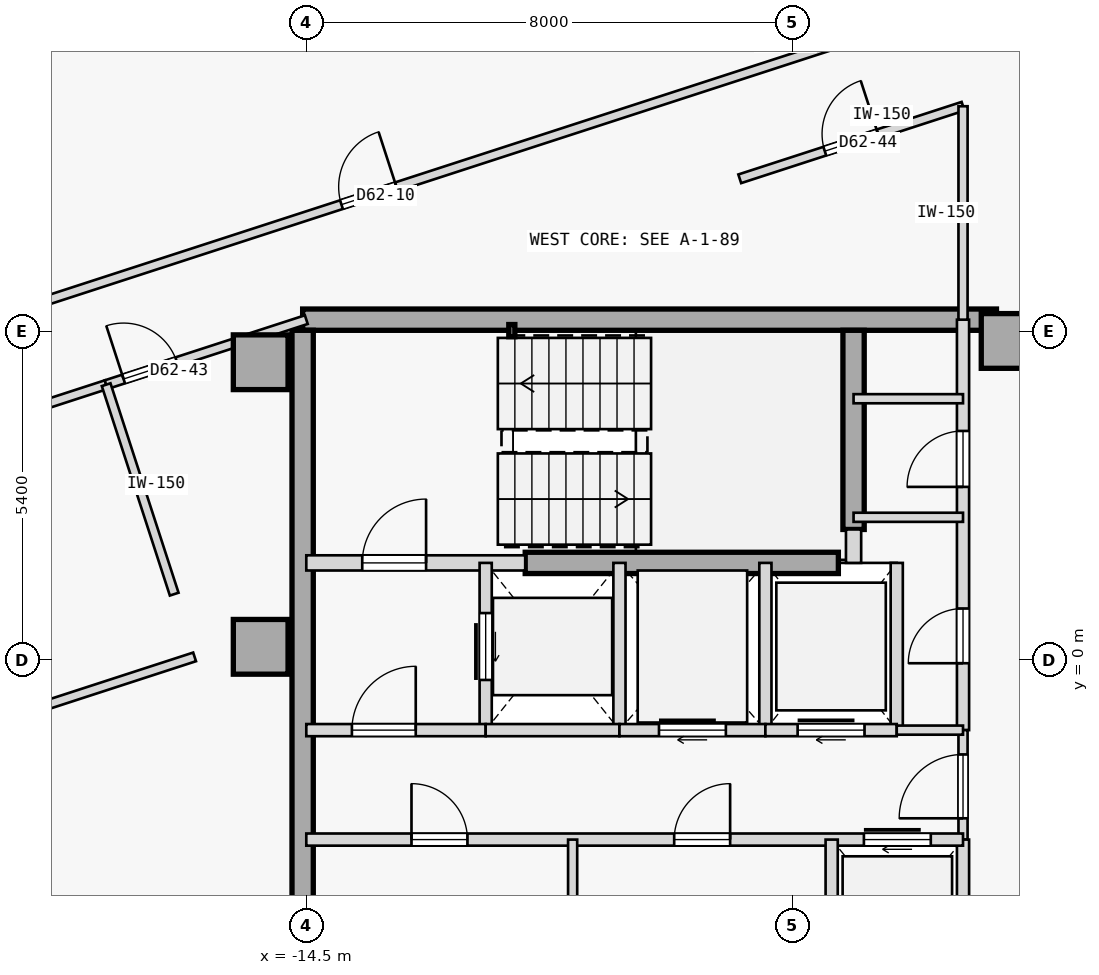
"""IFC4 building model, lengths in metres.
Left out: names, types, materials, properties, quantities, classifications, styles, units other than length and angle.
Written with IfcOpenShell. Run it as: python <this file> out.ifc"""

import sys

from ifc_helpers import new_model, si_unit, direction, frame, frame_2d, origin, origin_2d, place, context, subcontext, project, spatial, rectangle, hollow_rectangle, extrude, element, fill, save


model = new_model("IFC4")
c1 = context("Model", 3, precision=1e-05, world=origin(), true_north=direction((0.0, 1.0)))
c2 = subcontext(c1, "Body", "Model", "MODEL_VIEW")
j1 = project(units=[si_unit("LENGTHUNIT", "METRE"), si_unit("PLANEANGLEUNIT", "RADIAN")], contexts=[c1])
p1 = place(None, origin())
s1 = spatial("IfcSite", under=j1, at=p1, CompositionType="ELEMENT")
p2 = place(p1, origin())
s2 = spatial("IfcBuilding", under=s1, at=p2, CompositionType="ELEMENT")
p3 = place(p2, frame((0.0, 0.0, 234.35)))
s3 = spatial("IfcBuildingStorey", under=s2, at=p3, CompositionType="ELEMENT", Elevation=234.35)
for number, where, z_axis, x_axis in (
    (1, (-15.25, 4.9, 0.0), (0.0, 0.0, 1.0), (1.0, 0.0, 0.0)),
    (2, (-15.25, 0.22, 0.0), (0.0, 0.0, 1.0), (1.0, 0.0, 0.0)),
    (3, (-2.95, 5.25, 0.0), (0.0, 0.0, 1.0), (1.0, 0.0, 0.0)),
):
    element("IfcColumn", number, at=place(p3, frame(where, z_axis=z_axis, x_axis=x_axis)), inside=s3, PredefinedType="COLUMN", context=c2, shape_type="SweptSolid", body=[
        extrude(rectangle(XDim=0.9, YDim=0.9, at=origin_2d()), origin(), (0.0, 0.0, 1.0), 3.35),
    ])
p4 = place(p3, frame((-14.56, 5.6, 0.0), z_axis=(0.0, 0.0, 1.0), x_axis=(1.0, 0.0, 0.0)))
e4 = element("IfcWall", 4, at=p4, inside=s3, PredefinedType="SHEAR", context=c2, shape_type="SweptSolid", body=[
    extrude(rectangle(XDim=11.41, YDim=0.35, at=frame_2d((5.705, 0.0))), origin(), (0.0, 0.0, 1.0), 3.125),
])
p5 = place(p3, frame((-14.56, -5.425, 0.0), z_axis=(0.0, 0.0, 1.0), x_axis=(0.0, 1.0, 0.0)))
e5 = element("IfcWall", 5, at=p5, inside=s3, PredefinedType="SHEAR", context=c2, shape_type="SweptSolid", body=[
    extrude(rectangle(XDim=10.85, YDim=0.35, at=frame_2d((5.425, 0.0))), origin(), (0.0, 0.0, 1.0), 3.125),
])
p6 = place(p3, frame((-5.5, 2.15, 0.0), z_axis=(0.0, 0.0, 1.0), x_axis=(0.0, 1.0, 0.0)))
e6 = element("IfcWall", 6, at=p6, inside=s3, PredefinedType="SHEAR", context=c2, shape_type="SweptSolid", body=[
    extrude(rectangle(XDim=3.275, YDim=0.35, at=frame_2d((1.638, 0.0))), origin(), (0.0, 0.0, 1.0), 3.125),
])
p7 = place(p3, frame((-10.9, 1.6, 0.0), z_axis=(0.0, 0.0, 1.0), x_axis=(1.0, 0.0, 0.0)))
e7 = element("IfcWall", 7, at=p7, inside=s3, PredefinedType="SHEAR", context=c2, shape_type="SweptSolid", body=[
    extrude(rectangle(XDim=5.15, YDim=0.35, at=frame_2d((2.575, 0.0))), origin(), (0.0, 0.0, 1.0), 3.125),
])
p8 = place(p3, frame((-11.12, 5.42, 0.0), z_axis=(0.0, 0.0, 1.0), x_axis=(1.0, 0.0, 0.0)))
e8 = element("IfcColumn", 8, at=p8, inside=s3, PredefinedType="COLUMN", context=c2, shape_type="SweptSolid", body=[
    extrude(hollow_rectangle(XDim=0.1, YDim=0.2, WallThickness=0.008, at=origin_2d()), origin(), (0.0, 0.0, 1.0), 3.35),
])
p9 = place(p3, frame((-14.5, 1.6, 0.0), z_axis=(0.0, 0.0, 1.0), x_axis=(1.0, 0.0, 0.0)))
e9 = element("IfcWall", 9, at=p9, inside=s3, PredefinedType="STANDARD", context=c2, shape_type="SweptSolid", body=[
    extrude(rectangle(XDim=3.6, YDim=0.25, at=frame_2d((1.8, 0.0))), origin(), (0.0, 0.0, 1.0), 3.125),
])
p10 = place(p9, frame((0.92, 0.0, 0.0)))
e10 = element("IfcOpeningElement", 10, at=p10, cuts=e9, PredefinedType="OPENING", context=c2, shape_type="SweptSolid", body=[
    extrude(rectangle(XDim=1.05, YDim=2.15, at=frame_2d((0.525, 1.075))), frame((0.0, 0.135, 0.0), z_axis=(0.0, -1.0, 0.0), x_axis=(1.0, 0.0, 0.0)), (0.0, 0.0, 1.0), 0.27),
])
p11 = place(p3, frame((-5.5, 1.6, 0.0), z_axis=(0.0, 0.0, 1.0), x_axis=(0.0, 1.0, 0.0)))
e11 = element("IfcWall", 11, at=p11, inside=s3, PredefinedType="STANDARD", context=c2, shape_type="SweptSolid", body=[
    extrude(rectangle(XDim=0.55, YDim=0.25, at=frame_2d((0.275, 0.0))), origin(), (0.0, 0.0, 1.0), 3.125),
])
p12 = place(p3, frame((-3.7, -1.15, 0.0), z_axis=(0.0, 0.0, 1.0), x_axis=(0.0, 1.0, 0.0)))
e12 = element("IfcWall", 12, at=p12, inside=s3, PredefinedType="STANDARD", context=c2, shape_type="SweptSolid", body=[
    extrude(rectangle(XDim=6.75, YDim=0.2, at=frame_2d((3.375, 0.0))), origin(), (0.0, 0.0, 1.0), 3.125),
])
p13 = place(p12, frame((1.1, 0.0, 0.0)))
e13 = element("IfcOpeningElement", 13, at=p13, cuts=e12, PredefinedType="OPENING", context=c2, shape_type="SweptSolid", body=[
    extrude(rectangle(XDim=0.9, YDim=2.15, at=frame_2d((0.45, 1.075))), frame((0.0, 0.11, 0.0), z_axis=(0.0, -1.0, 0.0), x_axis=(1.0, 0.0, 0.0)), (0.0, 0.0, 1.0), 0.22),
])
p14 = place(p12, frame((4.0, 0.0, 0.0)))
e14 = element("IfcOpeningElement", 14, at=p14, cuts=e12, PredefinedType="OPENING", context=c2, shape_type="SweptSolid", body=[
    extrude(rectangle(XDim=0.92, YDim=2.15, at=frame_2d((0.46, 1.075))), frame((0.0, 0.11, 0.0), z_axis=(0.0, -1.0, 0.0), x_axis=(1.0, 0.0, 0.0)), (0.0, 0.0, 1.0), 0.22),
])
p15 = place(p3, frame((-3.7, -2.95, 0.0), z_axis=(0.0, 0.0, 1.0), x_axis=(0.0, 1.0, 0.0)))
e15 = element("IfcWall", 15, at=p15, inside=s3, PredefinedType="PARTITIONING", context=c2, shape_type="SweptSolid", body=[
    extrude(rectangle(XDim=1.8, YDim=0.15, at=frame_2d((0.9, 0.0))), origin(), (0.0, 0.0, 1.0), 3.125),
])
p16 = place(p15, frame((0.35, 0.0, 0.0)))
e16 = element("IfcOpeningElement", 16, at=p16, cuts=e15, PredefinedType="OPENING", context=c2, shape_type="SweptSolid", body=[
    extrude(rectangle(XDim=1.05, YDim=2.18, at=frame_2d((0.525, 1.09))), frame((0.0, 0.085, 0.0), z_axis=(0.0, -1.0, 0.0), x_axis=(1.0, 0.0, 0.0)), (0.0, 0.0, 1.0), 0.17),
])
p17 = place(p3, frame((-3.7, -5.6, 0.0), z_axis=(0.0, 0.0, 1.0), x_axis=(0.0, 1.0, 0.0)))
e17 = element("IfcWall", 17, at=p17, inside=s3, PredefinedType="STANDARD", context=c2, shape_type="SweptSolid", body=[
    extrude(rectangle(XDim=2.65, YDim=0.2, at=frame_2d((1.325, 0.0))), origin(), (0.0, 0.0, 1.0), 3.125),
])
p18 = place(p3, frame((-11.55, -1.15, 0.0), z_axis=(0.0, 0.0, 1.0), x_axis=(0.0, 1.0, 0.0)))
e18 = element("IfcWall", 18, at=p18, inside=s3, PredefinedType="STANDARD", context=c2, shape_type="SweptSolid", body=[
    extrude(rectangle(XDim=2.75, YDim=0.2, at=frame_2d((1.375, 0.0))), origin(), (0.0, 0.0, 1.0), 3.125),
])
p19 = place(p18, frame((0.825, 0.0, 0.0)))
e19 = element("IfcOpeningElement", 19, at=p19, cuts=e18, PredefinedType="OPENING", context=c2, shape_type="SweptSolid", body=[
    extrude(rectangle(XDim=1.1, YDim=2.15, at=frame_2d((0.55, 1.075))), frame((0.0, 0.11, 0.0), z_axis=(0.0, -1.0, 0.0), x_axis=(1.0, 0.0, 0.0)), (0.0, 0.0, 1.0), 0.22),
])
p20 = place(p3, frame((-9.35, -1.15, 0.0), z_axis=(0.0, 0.0, 1.0), x_axis=(0.0, 1.0, 0.0)))
e20 = element("IfcWall", 20, at=p20, inside=s3, PredefinedType="STANDARD", context=c2, shape_type="SweptSolid", body=[
    extrude(rectangle(XDim=2.75, YDim=0.2, at=frame_2d((1.375, 0.0))), origin(), (0.0, 0.0, 1.0), 3.125),
])
p21 = place(p3, frame((-14.5, -1.15, 0.0), z_axis=(0.0, 0.0, 1.0), x_axis=(1.0, 0.0, 0.0)))
e21 = element("IfcWall", 21, at=p21, inside=s3, PredefinedType="STANDARD", context=c2, shape_type="SweptSolid", body=[
    extrude(rectangle(XDim=2.95, YDim=0.2, at=frame_2d((1.475, 0.0))), origin(), (0.0, 0.0, 1.0), 3.125),
])
p22 = place(p21, frame((0.75, 0.0, 0.0)))
e22 = element("IfcOpeningElement", 22, at=p22, cuts=e21, PredefinedType="OPENING", context=c2, shape_type="SweptSolid", body=[
    extrude(rectangle(XDim=1.05, YDim=2.18, at=frame_2d((0.525, 1.09))), frame((0.0, 0.11, 0.0), z_axis=(0.0, -1.0, 0.0), x_axis=(1.0, 0.0, 0.0)), (0.0, 0.0, 1.0), 0.22),
])
p23 = place(p3, frame((-11.55, -1.15, 0.0), z_axis=(0.0, 0.0, 1.0), x_axis=(1.0, 0.0, 0.0)))
e23 = element("IfcWall", 23, at=p23, inside=s3, PredefinedType="STANDARD", context=c2, shape_type="SweptSolid", body=[
    extrude(rectangle(XDim=2.2, YDim=0.2, at=frame_2d((1.1, 0.0))), origin(), (0.0, 0.0, 1.0), 3.125),
])
p24 = place(p3, frame((-6.95, -1.15, 0.0), z_axis=(0.0, 0.0, 1.0), x_axis=(0.0, 1.0, 0.0)))
e24 = element("IfcWall", 24, at=p24, inside=s3, PredefinedType="STANDARD", context=c2, shape_type="SweptSolid", body=[
    extrude(rectangle(XDim=2.75, YDim=0.2, at=frame_2d((1.375, 0.0))), origin(), (0.0, 0.0, 1.0), 3.125),
])
p25 = place(p3, frame((-9.35, -1.15, 0.0), z_axis=(0.0, 0.0, 1.0), x_axis=(1.0, 0.0, 0.0)))
e25 = element("IfcWall", 25, at=p25, inside=s3, PredefinedType="STANDARD", context=c2, shape_type="SweptSolid", body=[
    extrude(rectangle(XDim=2.4, YDim=0.2, at=frame_2d((1.2, 0.0))), origin(), (0.0, 0.0, 1.0), 3.125),
])
p26 = place(p25, frame((0.65, 0.0, 0.0)))
e26 = element("IfcOpeningElement", 26, at=p26, cuts=e25, PredefinedType="OPENING", context=c2, shape_type="SweptSolid", body=[
    extrude(rectangle(XDim=1.1, YDim=2.15, at=frame_2d((0.55, 1.075))), frame((0.0, 0.11, 0.0), z_axis=(0.0, -1.0, 0.0), x_axis=(1.0, 0.0, 0.0)), (0.0, 0.0, 1.0), 0.22),
])
p27 = place(p3, frame((-4.79, -1.15, 0.0), z_axis=(0.0, 0.0, 1.0), x_axis=(0.0, 1.0, 0.0)))
e27 = element("IfcWall", 27, at=p27, inside=s3, PredefinedType="STANDARD", context=c2, shape_type="SweptSolid", body=[
    extrude(rectangle(XDim=2.75, YDim=0.2, at=frame_2d((1.375, 0.0))), origin(), (0.0, 0.0, 1.0), 3.125),
])
p28 = place(p3, frame((-6.95, -1.15, 0.0), z_axis=(0.0, 0.0, 1.0), x_axis=(1.0, 0.0, 0.0)))
e28 = element("IfcWall", 28, at=p28, inside=s3, PredefinedType="STANDARD", context=c2, shape_type="SweptSolid", body=[
    extrude(rectangle(XDim=2.16, YDim=0.2, at=frame_2d((1.08, 0.0))), origin(), (0.0, 0.0, 1.0), 3.125),
])
p29 = place(p28, frame((0.53, 0.0, 0.0)))
e29 = element("IfcOpeningElement", 29, at=p29, cuts=e28, PredefinedType="OPENING", context=c2, shape_type="SweptSolid", body=[
    extrude(rectangle(XDim=1.1, YDim=2.15, at=frame_2d((0.55, 1.075))), frame((0.0, 0.11, 0.0), z_axis=(0.0, -1.0, 0.0), x_axis=(1.0, 0.0, 0.0)), (0.0, 0.0, 1.0), 0.22),
])
p30 = place(p3, frame((-4.79, -1.15, 0.0), z_axis=(0.0, 0.0, 1.0), x_axis=(1.0, 0.0, 0.0)))
e30 = element("IfcWall", 30, at=p30, inside=s3, PredefinedType="PARTITIONING", context=c2, shape_type="SweptSolid", body=[
    extrude(rectangle(XDim=1.09, YDim=0.15, at=frame_2d((0.545, 0.0))), origin(), (0.0, 0.0, 1.0), 3.125),
])
p31 = place(p3, frame((-14.5, -2.95, 0.0), z_axis=(0.0, 0.0, 1.0), x_axis=(1.0, 0.0, 0.0)))
e31 = element("IfcWall", 31, at=p31, inside=s3, PredefinedType="STANDARD", context=c2, shape_type="SweptSolid", body=[
    extrude(rectangle(XDim=10.8, YDim=0.2, at=frame_2d((5.4, 0.0))), origin(), (0.0, 0.0, 1.0), 3.125),
])
p32 = place(p31, frame((9.17, 0.0, 0.0)))
e32 = element("IfcOpeningElement", 32, at=p32, cuts=e31, PredefinedType="OPENING", context=c2, shape_type="SweptSolid", body=[
    extrude(rectangle(XDim=1.1, YDim=2.15, at=frame_2d((0.55, 1.075))), frame((0.0, 0.11, 0.0), z_axis=(0.0, -1.0, 0.0), x_axis=(1.0, 0.0, 0.0)), (0.0, 0.0, 1.0), 0.22),
])
p33 = place(p31, frame((1.73, 0.0, 0.0)))
e33 = element("IfcOpeningElement", 33, at=p33, cuts=e31, PredefinedType="OPENING", context=c2, shape_type="SweptSolid", body=[
    extrude(rectangle(XDim=0.92, YDim=2.15, at=frame_2d((0.46, 1.075))), frame((0.0, 0.11, 0.0), z_axis=(0.0, -1.0, 0.0), x_axis=(1.0, 0.0, 0.0)), (0.0, 0.0, 1.0), 0.22),
])
p34 = place(p31, frame((6.05, 0.0, 0.0)))
e34 = element("IfcOpeningElement", 34, at=p34, cuts=e31, PredefinedType="OPENING", context=c2, shape_type="SweptSolid", body=[
    extrude(rectangle(XDim=0.92, YDim=2.15, at=frame_2d((0.46, 1.075))), frame((0.0, 0.11, 0.0), z_axis=(0.0, -1.0, 0.0), x_axis=(1.0, 0.0, 0.0)), (0.0, 0.0, 1.0), 0.22),
])
p35 = place(p3, frame((-5.86, -5.6, 0.0), z_axis=(0.0, 0.0, 1.0), x_axis=(0.0, 1.0, 0.0)))
e35 = element("IfcWall", 35, at=p35, inside=s3, PredefinedType="STANDARD", context=c2, shape_type="SweptSolid", body=[
    extrude(rectangle(XDim=2.65, YDim=0.2, at=frame_2d((1.325, 0.0))), origin(), (0.0, 0.0, 1.0), 3.125),
])
p36 = place(p3, frame((-10.12, -5.6, 0.0), z_axis=(0.0, 0.0, 1.0), x_axis=(0.0, 1.0, 0.0)))
e36 = element("IfcWall", 36, at=p36, inside=s3, PredefinedType="PARTITIONING", context=c2, shape_type="SweptSolid", body=[
    extrude(rectangle(XDim=2.65, YDim=0.15, at=frame_2d((1.325, 0.0))), origin(), (0.0, 0.0, 1.0), 3.125),
])
for number, where, z_axis, x_axis in (
    (37, (-5.5, 4.3, 0.0), (0.0, 0.0, 1.0), (1.0, 0.0, 0.0)),
    (38, (-5.5, 2.35, 0.0), (0.0, 0.0, 1.0), (1.0, 0.0, 0.0)),
):
    element("IfcWall", number, at=place(p3, frame(where, z_axis=z_axis, x_axis=x_axis)), inside=s3, PredefinedType="PARTITIONING", context=c2, shape_type="SweptSolid", body=[
        extrude(rectangle(XDim=1.8, YDim=0.15, at=frame_2d((0.9, 0.0))), origin(), (0.0, 0.0, 1.0), 3.125),
    ])
p37 = place(p3, frame((-22.586, 4.677, 0.0), z_axis=(0.0, 0.0, 1.0), x_axis=(0.951057743275, 0.309013218095, 0.0)))
e39 = element("IfcWall", 39, at=p37, inside=s3, PredefinedType="PARTITIONING", context=c2, shape_type="SweptSolid", body=[
    extrude(rectangle(XDim=19.171, YDim=0.15, at=frame_2d((9.585, 0.0))), origin(), (0.0, 0.0, 1.0), 3.125),
])
p38 = place(p37, frame((9.111, 0.0, 0.0)))
e40 = element("IfcOpeningElement", 40, at=p38, cuts=e39, PredefinedType="OPENING", context=c2, shape_type="SweptSolid", body=[
    extrude(rectangle(XDim=0.95, YDim=2.15, at=frame_2d((0.475, 1.075))), frame((0.0, 0.085, 0.0), z_axis=(0.0, -1.0, 0.0), x_axis=(1.0, 0.0, 0.0)), (0.0, 0.0, 1.0), 0.17),
])
p39 = place(p3, frame((-33.633, -0.616, 0.0), z_axis=(0.0, 0.0, 1.0), x_axis=(0.951058192995, 0.309011833974, 0.0)))
e41 = element("IfcWall", 41, at=p39, inside=s3, PredefinedType="PARTITIONING", context=c2, shape_type="SweptSolid", body=[
    extrude(rectangle(XDim=16.657, YDim=0.15, at=frame_2d((8.329, 0.0))), origin(), (0.0, 0.0, 1.0), 3.125),
])
p40 = place(p39, frame((7.868, 0.0, 0.0)))
e42 = element("IfcOpeningElement", 42, at=p40, cuts=e41, PredefinedType="OPENING", context=c2, shape_type="SweptSolid", body=[
    extrude(rectangle(XDim=0.92, YDim=2.15, at=frame_2d((0.46, 1.075))), frame((0.0, 0.085, 0.0), z_axis=(0.0, -1.0, 0.0), x_axis=(1.0, 0.0, 0.0)), (0.0, 0.0, 1.0), 0.17),
])
p41 = place(p3, frame((-17.792, 4.531, 0.0), z_axis=(0.0, 0.0, 1.0), x_axis=(0.951047546178, 0.309044600193, 0.0)))
e43 = element("IfcWall", 43, at=p41, inside=s3, PredefinedType="PARTITIONING", context=c2, shape_type="SweptSolid", body=[
    extrude(rectangle(XDim=3.461, YDim=0.15, at=frame_2d((1.73, 0.0))), origin(), (0.0, 0.0, 1.0), 3.125),
])
p42 = place(p41, frame((0.302, 0.0, 0.0)))
e44 = element("IfcOpeningElement", 44, at=p42, cuts=e43, PredefinedType="OPENING", context=c2, shape_type="SweptSolid", body=[
    extrude(rectangle(XDim=0.92, YDim=2.15, at=frame_2d((0.46, 1.075))), frame((0.0, 0.085, 0.0), z_axis=(0.0, -1.0, 0.0), x_axis=(1.0, 0.0, 0.0)), (0.0, 0.0, 1.0), 0.17),
])
p43 = place(p3, frame((-7.372, 7.917, 0.0), z_axis=(0.0, 0.0, 1.0), x_axis=(0.951052654993, 0.309028877989, 0.0)))
e45 = element("IfcWall", 45, at=p43, inside=s3, PredefinedType="PARTITIONING", context=c2, shape_type="SweptSolid", body=[
    extrude(rectangle(XDim=3.861, YDim=0.15, at=frame_2d((1.93, 0.0))), origin(), (0.0, 0.0, 1.0), 3.125),
])
p44 = place(p43, frame((1.47, 0.0, 0.0)))
e46 = element("IfcOpeningElement", 46, at=p44, cuts=e45, PredefinedType="OPENING", context=c2, shape_type="SweptSolid", body=[
    extrude(rectangle(XDim=0.92, YDim=2.15, at=frame_2d((0.46, 1.075))), frame((0.0, 0.085, 0.0), z_axis=(0.0, -1.0, 0.0), x_axis=(1.0, 0.0, 0.0)), (0.0, 0.0, 1.0), 0.17),
])
p45 = place(p3, frame((-3.7, 5.6, 0.0), z_axis=(0.0, 0.0, 1.0), x_axis=(0.000139120755, 0.999999990323, 0.0)))
e47 = element("IfcWall", 47, at=p45, inside=s3, PredefinedType="PARTITIONING", context=c2, shape_type="SweptSolid", body=[
    extrude(rectangle(XDim=3.51, YDim=0.15, at=frame_2d((1.755, 0.0))), origin(), (0.0, 0.0, 1.0), 3.125),
])
p46 = place(p3, frame((-32.179, -5.093, 0.0), z_axis=(0.0, 0.0, 1.0), x_axis=(0.951053885426, 0.309025091239, 0.0)))
e48 = element("IfcWall", 48, at=p46, inside=s3, PredefinedType="PARTITIONING", context=c2, shape_type="SweptSolid", body=[
    extrude(rectangle(XDim=16.657, YDim=0.15, at=frame_2d((8.329, 0.0))), origin(), (0.0, 0.0, 1.0), 3.125),
])
p47 = place(p3, frame((-16.672, 1.086, 0.0), z_axis=(0.0, 0.0, 1.0), x_axis=(-0.308979382511, 0.951068736308, 0.0)))
e49 = element("IfcWall", 49, at=p47, inside=s3, PredefinedType="PARTITIONING", context=c2, shape_type="SweptSolid", body=[
    extrude(rectangle(XDim=3.622, YDim=0.15, at=frame_2d((1.811, 0.0))), origin(), (0.0, 0.0, 1.0), 3.125),
])
p48 = place(p10, origin())
e50 = element("IfcDoor", 50, at=p48, inside=s3, OperationType="SINGLE_SWING_RIGHT", PredefinedType="DOOR", context=c2, shape_type="SweptSolid", body=[
    extrude(rectangle(XDim=1.05, YDim=2.15, at=frame_2d((0.525, 1.075))), frame((0.0, 0.025, 0.0), z_axis=(0.0, -1.0, 0.0), x_axis=(1.0, 0.0, 0.0)), (0.0, 0.0, 1.0), 0.05),
])
fill(e10, e50)
p49 = place(p22, origin())
e51 = element("IfcDoor", 51, at=p49, inside=s3, OperationType="SINGLE_SWING_RIGHT", PredefinedType="DOOR", context=c2, shape_type="SweptSolid", body=[
    extrude(rectangle(XDim=1.05, YDim=2.18, at=frame_2d((0.525, 1.09))), frame((0.0, 0.025, 0.0), z_axis=(0.0, -1.0, 0.0), x_axis=(1.0, 0.0, 0.0)), (0.0, 0.0, 1.0), 0.05),
])
fill(e22, e51)
p50 = place(p16, origin())
e52 = element("IfcDoor", 52, at=p50, inside=s3, OperationType="SINGLE_SWING_LEFT", PredefinedType="DOOR", context=c2, shape_type="SweptSolid", body=[
    extrude(rectangle(XDim=1.05, YDim=2.18, at=frame_2d((0.525, 1.09))), frame((0.0, 0.025, 0.0), z_axis=(0.0, -1.0, 0.0), x_axis=(1.0, 0.0, 0.0)), (0.0, 0.0, 1.0), 0.05),
])
fill(e16, e52)
p51 = place(p19, origin())
e53 = element("IfcDoor", 53, at=p51, inside=s3, OperationType="SLIDING_TO_RIGHT", PredefinedType="DOOR", context=c2, shape_type="SweptSolid", body=[
    extrude(rectangle(XDim=1.1, YDim=2.15, at=frame_2d((0.55, 1.075))), frame((0.0, 0.025, 0.0), z_axis=(0.0, -1.0, 0.0), x_axis=(1.0, 0.0, 0.0)), (0.0, 0.0, 1.0), 0.05),
])
fill(e19, e53)
p52 = place(p26, origin())
e54 = element("IfcDoor", 54, at=p52, inside=s3, OperationType="SLIDING_TO_RIGHT", PredefinedType="DOOR", context=c2, shape_type="SweptSolid", body=[
    extrude(rectangle(XDim=1.1, YDim=2.15, at=frame_2d((0.55, 1.075))), frame((0.0, 0.025, 0.0), z_axis=(0.0, -1.0, 0.0), x_axis=(1.0, 0.0, 0.0)), (0.0, 0.0, 1.0), 0.05),
])
fill(e26, e54)
p53 = place(p29, origin())
e55 = element("IfcDoor", 55, at=p53, inside=s3, OperationType="SLIDING_TO_RIGHT", PredefinedType="DOOR", context=c2, shape_type="SweptSolid", body=[
    extrude(rectangle(XDim=1.1, YDim=2.15, at=frame_2d((0.55, 1.075))), frame((0.0, 0.025, 0.0), z_axis=(0.0, -1.0, 0.0), x_axis=(1.0, 0.0, 0.0)), (0.0, 0.0, 1.0), 0.05),
])
fill(e29, e55)
p54 = place(p32, origin())
e56 = element("IfcDoor", 56, at=p54, inside=s3, OperationType="SLIDING_TO_RIGHT", PredefinedType="DOOR", context=c2, shape_type="SweptSolid", body=[
    extrude(rectangle(XDim=1.1, YDim=2.15, at=frame_2d((0.55, 1.075))), frame((0.0, 0.025, 0.0), z_axis=(0.0, -1.0, 0.0), x_axis=(1.0, 0.0, 0.0)), (0.0, 0.0, 1.0), 0.05),
])
fill(e32, e56)
p55 = place(p33, origin())
e57 = element("IfcDoor", 57, at=p55, inside=s3, OperationType="SINGLE_SWING_LEFT", PredefinedType="DOOR", context=c2, shape_type="SweptSolid", body=[
    extrude(rectangle(XDim=0.92, YDim=2.15, at=frame_2d((0.46, 1.075))), frame((0.0, 0.025, 0.0), z_axis=(0.0, -1.0, 0.0), x_axis=(1.0, 0.0, 0.0)), (0.0, 0.0, 1.0), 0.05),
])
fill(e33, e57)
p56 = place(p34, origin())
e58 = element("IfcDoor", 58, at=p56, inside=s3, OperationType="SINGLE_SWING_RIGHT", PredefinedType="DOOR", context=c2, shape_type="SweptSolid", body=[
    extrude(rectangle(XDim=0.92, YDim=2.15, at=frame_2d((0.46, 1.075))), frame((0.0, 0.025, 0.0), z_axis=(0.0, -1.0, 0.0), x_axis=(1.0, 0.0, 0.0)), (0.0, 0.0, 1.0), 0.05),
])
fill(e34, e58)
p57 = place(p13, origin())
e59 = element("IfcDoor", 59, at=p57, inside=s3, OperationType="SINGLE_SWING_LEFT", PredefinedType="DOOR", context=c2, shape_type="SweptSolid", body=[
    extrude(rectangle(XDim=0.9, YDim=2.15, at=frame_2d((0.45, 1.075))), frame((0.0, 0.025, 0.0), z_axis=(0.0, -1.0, 0.0), x_axis=(1.0, 0.0, 0.0)), (0.0, 0.0, 1.0), 0.05),
])
fill(e13, e59)
p58 = place(p14, origin())
e60 = element("IfcDoor", 60, at=p58, inside=s3, OperationType="SINGLE_SWING_LEFT", PredefinedType="DOOR", context=c2, shape_type="SweptSolid", body=[
    extrude(rectangle(XDim=0.92, YDim=2.15, at=frame_2d((0.46, 1.075))), frame((0.0, 0.025, 0.0), z_axis=(0.0, -1.0, 0.0), x_axis=(1.0, 0.0, 0.0)), (0.0, 0.0, 1.0), 0.05),
])
fill(e14, e60)
p59 = place(p38, origin())
e61 = element("IfcDoor", 61, at=p59, inside=s3, OperationType="SINGLE_SWING_RIGHT", PredefinedType="DOOR", context=c2, shape_type="SweptSolid", body=[
    extrude(rectangle(XDim=0.95, YDim=2.15, at=frame_2d((0.475, 1.075))), frame((0.0, 0.025, 0.0), z_axis=(0.0, -1.0, 0.0), x_axis=(1.0, 0.0, 0.0)), (0.0, 0.0, 1.0), 0.05),
])
fill(e40, e61)
p60 = place(p42, origin())
e62 = element("IfcDoor", 62, at=p60, inside=s3, OperationType="SINGLE_SWING_LEFT", PredefinedType="DOOR", context=c2, shape_type="SweptSolid", body=[
    extrude(rectangle(XDim=0.92, YDim=2.15, at=frame_2d((0.46, 1.075))), frame((0.0, 0.025, 0.0), z_axis=(0.0, -1.0, 0.0), x_axis=(1.0, 0.0, 0.0)), (0.0, 0.0, 1.0), 0.05),
])
fill(e44, e62)
p61 = place(p44, origin())
e63 = element("IfcDoor", 63, at=p61, inside=s3, OperationType="SINGLE_SWING_RIGHT", PredefinedType="DOOR", context=c2, shape_type="SweptSolid", body=[
    extrude(rectangle(XDim=0.92, YDim=2.15, at=frame_2d((0.46, 1.075))), frame((0.0, 0.025, 0.0), z_axis=(0.0, -1.0, 0.0), x_axis=(1.0, 0.0, 0.0)), (0.0, 0.0, 1.0), 0.05),
])
fill(e46, e63)
save(model, sys.argv[1])
